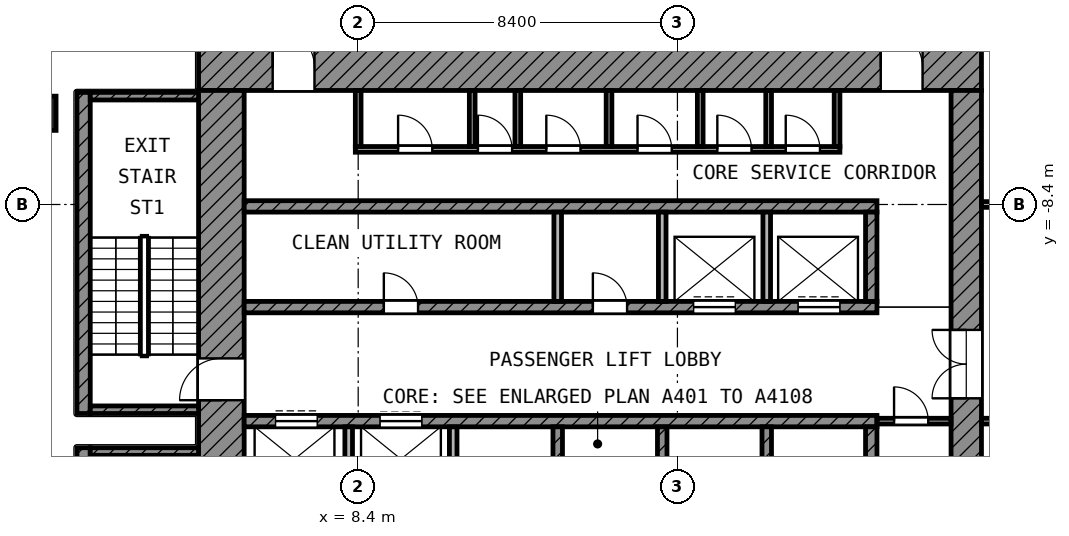
"""IFC4 building model, lengths in metres.
Left out: names, types, materials, properties, quantities, classifications, styles, units other than length and angle.
Written with IfcOpenShell. Run it as: python <this file> out.ifc"""

import sys

from ifc_helpers import new_model, si_unit, direction, frame, frame_2d, origin, origin_2d, place, context, subcontext, project, spatial, rectangle, extrude, element, fill, save


model = new_model("IFC4")
c1 = context("Model", 3, precision=1e-05, world=origin(), true_north=direction((0.0, 1.0)))
c2 = subcontext(c1, "Body", "Model", "MODEL_VIEW")
j1 = project(units=[si_unit("LENGTHUNIT", "METRE"), si_unit("PLANEANGLEUNIT", "RADIAN")], contexts=[c1])
p1 = place(None, origin())
s1 = spatial("IfcSite", under=j1, at=p1, CompositionType="ELEMENT")
p2 = place(p1, origin())
s2 = spatial("IfcBuilding", under=s1, at=p2, CompositionType="ELEMENT")
p3 = place(p2, frame((0.0, 0.0, 239.0)))
s3 = spatial("IfcBuildingStorey", under=s2, at=p3, CompositionType="ELEMENT", Elevation=239.0)
p4 = place(p3, frame((0.0, -6.0, 0.0), z_axis=(0.0, 0.0, 1.0), x_axis=(1.0, 0.0, 0.0)))
e1 = element("IfcColumn", 1, at=p4, inside=s3, PredefinedType="COLUMN", context=c2, shape_type="SweptSolid", body=[
    extrude(rectangle(XDim=0.9, YDim=0.9, at=origin_2d()), origin(), (0.0, 0.0, 1.0), 4.2),
])
p5 = place(p3, frame((4.2, -4.8, 0.0), z_axis=(0.0, 0.0, 1.0), x_axis=(1.0, 0.0, 0.0)))
e2 = element("IfcWall", 2, at=p5, inside=s3, PredefinedType="SHEAR", context=c2, shape_type="SweptSolid", body=[
    extrude(rectangle(XDim=20.6, YDim=1.2, at=frame_2d((10.3, 0.0))), origin(), (0.0, 0.0, 1.0), 3.6),
])
p6 = place(p5, frame((1.95, 0.0, 0.0)))
e3 = element("IfcOpeningElement", 3, at=p6, cuts=e2, PredefinedType="OPENING", context=c2, shape_type="SweptSolid", body=[
    extrude(rectangle(XDim=1.1, YDim=2.1, at=frame_2d((0.55, 1.05))), frame((0.0, 0.61, 0.0), z_axis=(0.0, -1.0, 0.0), x_axis=(1.0, 0.0, 0.0)), (0.0, 0.0, 1.0), 1.22),
])
p7 = place(p5, frame((17.95, 0.0, 0.0)))
e4 = element("IfcOpeningElement", 4, at=p7, cuts=e2, PredefinedType="OPENING", context=c2, shape_type="SweptSolid", body=[
    extrude(rectangle(XDim=1.1, YDim=2.1, at=frame_2d((0.55, 1.05))), frame((0.0, 0.61, 0.0), z_axis=(0.0, -1.0, 0.0), x_axis=(1.0, 0.0, 0.0)), (0.0, 0.0, 1.0), 1.22),
])
p8 = place(p3, frame((4.8, -24.8, 0.0), z_axis=(0.0, 0.0, 1.0), x_axis=(0.0, 1.0, 0.0)))
e5 = element("IfcWall", 5, at=p8, inside=s3, PredefinedType="SHEAR", context=c2, shape_type="SweptSolid", body=[
    extrude(rectangle(XDim=19.4, YDim=1.2, at=frame_2d((9.7, 0.0))), origin(), (0.0, 0.0, 1.0), 3.6),
])
p9 = place(p8, frame((11.25, 0.0, 0.0)))
e6 = element("IfcOpeningElement", 6, at=p9, cuts=e5, PredefinedType="OPENING", context=c2, shape_type="SweptSolid", body=[
    extrude(rectangle(XDim=1.1, YDim=2.1, at=frame_2d((0.55, 1.05))), frame((0.0, 0.61, 0.0), z_axis=(0.0, -1.0, 0.0), x_axis=(1.0, 0.0, 0.0)), (0.0, 0.0, 1.0), 1.22),
])
p10 = place(p8, frame((1.95, 0.0, 0.0)))
e7 = element("IfcOpeningElement", 7, at=p10, cuts=e5, PredefinedType="OPENING", context=c2, shape_type="SweptSolid", body=[
    extrude(rectangle(XDim=1.1, YDim=2.1, at=frame_2d((0.55, 1.05))), frame((0.0, 0.61, 0.0), z_axis=(0.0, -1.0, 0.0), x_axis=(1.0, 0.0, 0.0)), (0.0, 0.0, 1.0), 1.22),
])
p11 = place(p3, frame((24.4, -24.0, 0.0), z_axis=(0.0, 0.0, 1.0), x_axis=(0.0, 1.0, 0.0)))
e8 = element("IfcWall", 8, at=p11, inside=s3, PredefinedType="SHEAR", context=c2, shape_type="SweptSolid", body=[
    extrude(rectangle(XDim=18.6, YDim=0.8, at=frame_2d((9.3, 0.0))), origin(), (0.0, 0.0, 1.0), 3.6),
])
p12 = place(p11, frame((10.5, 0.0, 0.0)))
e9 = element("IfcOpeningElement", 9, at=p12, cuts=e8, PredefinedType="OPENING", context=c2, shape_type="SweptSolid", body=[
    extrude(rectangle(XDim=1.8, YDim=2.1, at=frame_2d((0.9, 1.05))), frame((0.0, 0.41, 0.0), z_axis=(0.0, -1.0, 0.0), x_axis=(1.0, 0.0, 0.0)), (0.0, 0.0, 1.0), 0.82),
])
p13 = place(p3, frame((5.4, -8.45, 0.0), z_axis=(0.0, 0.0, 1.0), x_axis=(1.0, 0.0, 0.0)))
e10 = element("IfcWall", 10, at=p13, inside=s3, PredefinedType="SHEAR", context=c2, shape_type="SweptSolid", body=[
    extrude(rectangle(XDim=16.65, YDim=0.3, at=frame_2d((8.325, 0.0))), origin(), (0.0, 0.0, 1.0), 3.6),
])
p14 = place(p3, frame((5.4, -11.1, 0.0), z_axis=(0.0, 0.0, 1.0), x_axis=(1.0, 0.0, 0.0)))
e11 = element("IfcWall", 11, at=p14, inside=s3, PredefinedType="SHEAR", context=c2, shape_type="SweptSolid", body=[
    extrude(rectangle(XDim=16.65, YDim=0.3, at=frame_2d((8.325, 0.0))), origin(), (0.0, 0.0, 1.0), 3.6),
])
p15 = place(p14, frame((11.825, 0.0, 0.0)))
e12 = element("IfcOpeningElement", 12, at=p15, cuts=e11, PredefinedType="OPENING", context=c2, shape_type="SweptSolid", body=[
    extrude(rectangle(XDim=1.1, YDim=2.1, at=frame_2d((0.55, 1.05))), frame((0.0, 0.16, 0.0), z_axis=(0.0, -1.0, 0.0), x_axis=(1.0, 0.0, 0.0)), (0.0, 0.0, 1.0), 0.32),
])
p16 = place(p14, frame((14.575, 0.0, 0.0)))
e13 = element("IfcOpeningElement", 13, at=p16, cuts=e11, PredefinedType="OPENING", context=c2, shape_type="SweptSolid", body=[
    extrude(rectangle(XDim=1.1, YDim=2.1, at=frame_2d((0.55, 1.05))), frame((0.0, 0.16, 0.0), z_axis=(0.0, -1.0, 0.0), x_axis=(1.0, 0.0, 0.0)), (0.0, 0.0, 1.0), 0.32),
])
p17 = place(p14, frame((3.675, 0.0, 0.0)))
e14 = element("IfcOpeningElement", 14, at=p17, cuts=e11, PredefinedType="OPENING", context=c2, shape_type="SweptSolid", body=[
    extrude(rectangle(XDim=0.9, YDim=2.1, at=frame_2d((0.45, 1.05))), frame((0.0, 0.16, 0.0), z_axis=(0.0, -1.0, 0.0), x_axis=(1.0, 0.0, 0.0)), (0.0, 0.0, 1.0), 0.32),
])
p18 = place(p14, frame((9.175, 0.0, 0.0)))
e15 = element("IfcOpeningElement", 15, at=p18, cuts=e11, PredefinedType="OPENING", context=c2, shape_type="SweptSolid", body=[
    extrude(rectangle(XDim=0.9, YDim=2.1, at=frame_2d((0.45, 1.05))), frame((0.0, 0.16, 0.0), z_axis=(0.0, -1.0, 0.0), x_axis=(1.0, 0.0, 0.0)), (0.0, 0.0, 1.0), 0.32),
])
p19 = place(p3, frame((5.4, -14.1, 0.0), z_axis=(0.0, 0.0, 1.0), x_axis=(1.0, 0.0, 0.0)))
e16 = element("IfcWall", 16, at=p19, inside=s3, PredefinedType="SHEAR", context=c2, shape_type="SweptSolid", body=[
    extrude(rectangle(XDim=16.65, YDim=0.3, at=frame_2d((8.325, 0.0))), origin(), (0.0, 0.0, 1.0), 3.6),
])
p20 = place(p19, frame((0.825, 0.0, 0.0)))
e17 = element("IfcOpeningElement", 17, at=p20, cuts=e16, PredefinedType="OPENING", context=c2, shape_type="SweptSolid", body=[
    extrude(rectangle(XDim=1.1, YDim=2.1, at=frame_2d((0.55, 1.05))), frame((0.0, 0.16, 0.0), z_axis=(0.0, -1.0, 0.0), x_axis=(1.0, 0.0, 0.0)), (0.0, 0.0, 1.0), 0.32),
])
p21 = place(p19, frame((3.575, 0.0, 0.0)))
e18 = element("IfcOpeningElement", 18, at=p21, cuts=e16, PredefinedType="OPENING", context=c2, shape_type="SweptSolid", body=[
    extrude(rectangle(XDim=1.1, YDim=2.1, at=frame_2d((0.55, 1.05))), frame((0.0, 0.16, 0.0), z_axis=(0.0, -1.0, 0.0), x_axis=(1.0, 0.0, 0.0)), (0.0, 0.0, 1.0), 0.32),
])
p22 = place(p3, frame((21.9, -10.95, 0.0), z_axis=(0.0, 0.0, 1.0), x_axis=(0.0, 1.0, 0.0)))
e19 = element("IfcWall", 19, at=p22, inside=s3, PredefinedType="SHEAR", context=c2, shape_type="SweptSolid", body=[
    extrude(rectangle(XDim=2.35, YDim=0.3, at=frame_2d((1.175, 0.0))), origin(), (0.0, 0.0, 1.0), 3.6),
])
p23 = place(p3, frame((21.9, -16.6, 0.0), z_axis=(0.0, 0.0, 1.0), x_axis=(0.0, 1.0, 0.0)))
e20 = element("IfcWall", 20, at=p23, inside=s3, PredefinedType="SHEAR", context=c2, shape_type="SweptSolid", body=[
    extrude(rectangle(XDim=2.35, YDim=0.3, at=frame_2d((1.175, 0.0))), origin(), (0.0, 0.0, 1.0), 3.6),
])
for number, where, z_axis, x_axis in (
    (21, (13.65, -10.95, 0.0), (0.0, 0.0, 1.0), (0.0, 1.0, 0.0)),
    (22, (16.4, -10.95, 0.0), (0.0, 0.0, 1.0), (0.0, 1.0, 0.0)),
    (23, (19.15, -10.95, 0.0), (0.0, 0.0, 1.0), (0.0, 1.0, 0.0)),
):
    element("IfcWall", number, at=place(p3, frame(where, z_axis=z_axis, x_axis=x_axis)), inside=s3, PredefinedType="PARTITIONING", context=c2, shape_type="SweptSolid", body=[
        extrude(rectangle(XDim=2.35, YDim=0.2, at=frame_2d((1.175, 0.0))), origin(), (0.0, 0.0, 1.0), 3.6),
    ])
for number, where, z_axis, x_axis in (
    (24, (8.15, -16.6, 0.0), (0.0, 0.0, 1.0), (0.0, 1.0, 0.0)),
    (25, (10.9, -16.6, 0.0), (0.0, 0.0, 1.0), (0.0, 1.0, 0.0)),
):
    element("IfcWall", number, at=place(p3, frame(where, z_axis=z_axis, x_axis=x_axis)), inside=s3, PredefinedType="PARTITIONING", context=c2, shape_type="SweptSolid", body=[
        extrude(rectangle(XDim=2.35, YDim=0.2, at=frame_2d((1.175, 0.0))), origin(), (0.0, 0.0, 1.0), 3.6),
    ])
for number, where, z_axis, x_axis in (
    (26, (13.65, -16.6, 0.0), (0.0, 0.0, 1.0), (0.0, 1.0, 0.0)),
    (27, (16.4, -16.6, 0.0), (0.0, 0.0, 1.0), (0.0, 1.0, 0.0)),
    (28, (19.15, -16.6, 0.0), (0.0, 0.0, 1.0), (0.0, 1.0, 0.0)),
):
    element("IfcWall", number, at=place(p3, frame(where, z_axis=z_axis, x_axis=x_axis)), inside=s3, PredefinedType="SHEAR", context=c2, shape_type="SweptSolid", body=[
        extrude(rectangle(XDim=2.35, YDim=0.25, at=frame_2d((1.175, 0.0))), origin(), (0.0, 0.0, 1.0), 3.6),
    ])
p24 = place(p3, frame((22.05, -14.1, 0.0), z_axis=(0.0, 0.0, 1.0), x_axis=(1.0, 0.0, 0.0)))
e29 = element("IfcWall", 29, at=p24, inside=s3, PredefinedType="PARTITIONING", context=c2, shape_type="SweptSolid", body=[
    extrude(rectangle(XDim=1.95, YDim=0.15, at=frame_2d((0.975, 0.0))), origin(), (0.0, 0.0, 1.0), 3.6),
])
p25 = place(p24, frame((0.45, 0.0, 0.0)))
e30 = element("IfcOpeningElement", 30, at=p25, cuts=e29, PredefinedType="OPENING", context=c2, shape_type="SweptSolid", body=[
    extrude(rectangle(XDim=0.9, YDim=2.1, at=frame_2d((0.45, 1.05))), frame((0.0, 0.085, 0.0), z_axis=(0.0, -1.0, 0.0), x_axis=(1.0, 0.0, 0.0)), (0.0, 0.0, 1.0), 0.17),
])
p26 = place(p3, frame((8.325, -6.95, 0.0), z_axis=(0.0, 0.0, 1.0), x_axis=(1.0, 0.0, 0.0)))
e31 = element("IfcWall", 31, at=p26, inside=s3, PredefinedType="PARTITIONING", context=c2, shape_type="SweptSolid", body=[
    extrude(rectangle(XDim=12.75, YDim=0.15, at=frame_2d((6.375, 0.0))), origin(), (0.0, 0.0, 1.0), 3.6),
])
p27 = place(p26, frame((1.125, 0.0, 0.0)))
e32 = element("IfcOpeningElement", 32, at=p27, cuts=e31, PredefinedType="OPENING", context=c2, shape_type="SweptSolid", body=[
    extrude(rectangle(XDim=0.9, YDim=2.1, at=frame_2d((0.45, 1.05))), frame((0.0, 0.085, 0.0), z_axis=(0.0, -1.0, 0.0), x_axis=(1.0, 0.0, 0.0)), (0.0, 0.0, 1.0), 0.17),
])
p28 = place(p26, frame((3.225, 0.0, 0.0)))
e33 = element("IfcOpeningElement", 33, at=p28, cuts=e31, PredefinedType="OPENING", context=c2, shape_type="SweptSolid", body=[
    extrude(rectangle(XDim=0.9, YDim=2.1, at=frame_2d((0.45, 1.05))), frame((0.0, 0.085, 0.0), z_axis=(0.0, -1.0, 0.0), x_axis=(1.0, 0.0, 0.0)), (0.0, 0.0, 1.0), 0.17),
])
p29 = place(p26, frame((5.025, 0.0, 0.0)))
e34 = element("IfcOpeningElement", 34, at=p29, cuts=e31, PredefinedType="OPENING", context=c2, shape_type="SweptSolid", body=[
    extrude(rectangle(XDim=0.9, YDim=2.1, at=frame_2d((0.45, 1.05))), frame((0.0, 0.085, 0.0), z_axis=(0.0, -1.0, 0.0), x_axis=(1.0, 0.0, 0.0)), (0.0, 0.0, 1.0), 0.17),
])
p30 = place(p26, frame((7.425, 0.0, 0.0)))
e35 = element("IfcOpeningElement", 35, at=p30, cuts=e31, PredefinedType="OPENING", context=c2, shape_type="SweptSolid", body=[
    extrude(rectangle(XDim=0.9, YDim=2.1, at=frame_2d((0.45, 1.05))), frame((0.0, 0.085, 0.0), z_axis=(0.0, -1.0, 0.0), x_axis=(1.0, 0.0, 0.0)), (0.0, 0.0, 1.0), 0.17),
])
p31 = place(p26, frame((9.525, 0.0, 0.0)))
e36 = element("IfcOpeningElement", 36, at=p31, cuts=e31, PredefinedType="OPENING", context=c2, shape_type="SweptSolid", body=[
    extrude(rectangle(XDim=0.9, YDim=2.1, at=frame_2d((0.45, 1.05))), frame((0.0, 0.085, 0.0), z_axis=(0.0, -1.0, 0.0), x_axis=(1.0, 0.0, 0.0)), (0.0, 0.0, 1.0), 0.17),
])
p32 = place(p26, frame((11.325, 0.0, 0.0)))
e37 = element("IfcOpeningElement", 37, at=p32, cuts=e31, PredefinedType="OPENING", context=c2, shape_type="SweptSolid", body=[
    extrude(rectangle(XDim=0.9, YDim=2.1, at=frame_2d((0.45, 1.05))), frame((0.0, 0.085, 0.0), z_axis=(0.0, -1.0, 0.0), x_axis=(1.0, 0.0, 0.0)), (0.0, 0.0, 1.0), 0.17),
])
for number, where, z_axis, x_axis in (
    (38, (8.4, -6.875, 0.0), (0.0, 0.0, 1.0), (0.0, 1.0, 0.0)),
    (39, (11.4, -6.875, 0.0), (0.0, 0.0, 1.0), (0.0, 1.0, 0.0)),
    (40, (12.6, -6.875, 0.0), (0.0, 0.0, 1.0), (0.0, 1.0, 0.0)),
    (41, (15.0, -6.875, 0.0), (0.0, 0.0, 1.0), (0.0, 1.0, 0.0)),
    (42, (17.4, -6.875, 0.0), (0.0, 0.0, 1.0), (0.0, 1.0, 0.0)),
    (43, (19.2, -6.875, 0.0), (0.0, 0.0, 1.0), (0.0, 1.0, 0.0)),
    (44, (21.0, -6.875, 0.0), (0.0, 0.0, 1.0), (0.0, 1.0, 0.0)),
):
    element("IfcWall", number, at=place(p3, frame(where, z_axis=z_axis, x_axis=x_axis)), inside=s3, PredefinedType="PARTITIONING", context=c2, shape_type="SweptSolid", body=[
        extrude(rectangle(XDim=1.475, YDim=0.15, at=frame_2d((0.738, 0.0))), origin(), (0.0, 0.0, 1.0), 3.6),
    ])
p33 = place(p3, frame((1.175, -13.9, 0.0), z_axis=(0.0, 0.0, 1.0), x_axis=(0.0, 1.0, 0.0)))
e45 = element("IfcWall", 45, at=p33, inside=s3, PredefinedType="SHEAR", context=c2, shape_type="SweptSolid", body=[
    extrude(rectangle(XDim=8.45, YDim=0.35, at=frame_2d((4.225, 0.0))), origin(), (0.0, 0.0, 1.0), 3.6),
])
for number, where, z_axis, x_axis in (
    (46, (1.35, -5.55, 0.0), (0.0, 0.0, 1.0), (1.0, 0.0, 0.0)),
    (47, (1.35, -13.8, 0.0), (0.0, 0.0, 1.0), (1.0, 0.0, 0.0)),
):
    element("IfcWall", number, at=place(p3, frame(where, z_axis=z_axis, x_axis=x_axis)), inside=s3, PredefinedType="SHEAR", context=c2, shape_type="SweptSolid", body=[
        extrude(rectangle(XDim=2.85, YDim=0.2, at=frame_2d((1.425, 0.0))), origin(), (0.0, 0.0, 1.0), 3.6),
    ])
p34 = place(p3, frame((1.175, -23.25, 0.0), z_axis=(0.0, 0.0, 1.0), x_axis=(0.0, 1.0, 0.0)))
e48 = element("IfcWall", 48, at=p34, inside=s3, PredefinedType="SHEAR", context=c2, shape_type="SweptSolid", body=[
    extrude(rectangle(XDim=8.45, YDim=0.35, at=frame_2d((4.225, 0.0))), origin(), (0.0, 0.0, 1.0), 3.6),
])
p35 = place(p3, frame((1.35, -14.9, 0.0), z_axis=(0.0, 0.0, 1.0), x_axis=(1.0, 0.0, 0.0)))
e49 = element("IfcWall", 49, at=p35, inside=s3, PredefinedType="SHEAR", context=c2, shape_type="SweptSolid", body=[
    extrude(rectangle(XDim=2.85, YDim=0.2, at=frame_2d((1.425, 0.0))), origin(), (0.0, 0.0, 1.0), 3.6),
])
p36 = place(p3, frame((24.8, -14.1, 0.0), z_axis=(0.0, 0.0, 1.0), x_axis=(1.0, 0.0, 0.0)))
e50 = element("IfcWall", 50, at=p36, inside=s3, PredefinedType="PARTITIONING", context=c2, shape_type="SweptSolid", body=[
    extrude(rectangle(XDim=4.525, YDim=0.15, at=frame_2d((2.262, 0.0))), origin(), (0.0, 0.0, 1.0), 3.6),
])
p37 = place(p36, frame((1.75, 0.0, 0.0)))
e51 = element("IfcOpeningElement", 51, at=p37, cuts=e50, PredefinedType="OPENING", context=c2, shape_type="SweptSolid", body=[
    extrude(rectangle(XDim=1.5, YDim=2.1, at=frame_2d((0.75, 1.05))), frame((0.0, 0.085, 0.0), z_axis=(0.0, -1.0, 0.0), x_axis=(1.0, 0.0, 0.0)), (0.0, 0.0, 1.0), 0.17),
])
p38 = place(p3, frame((24.8, -8.4, 0.0), z_axis=(0.0, 0.0, 1.0), x_axis=(1.0, 0.0, 0.0)))
e52 = element("IfcWall", 52, at=p38, inside=s3, PredefinedType="PARTITIONING", context=c2, shape_type="SweptSolid", body=[
    extrude(rectangle(XDim=15.432, YDim=0.15, at=frame_2d((7.716, 0.0))), origin(), (0.0, 0.0, 1.0), 3.6),
])
p39 = place(p38, frame((9.3, 0.0, 0.0)))
e53 = element("IfcOpeningElement", 53, at=p39, cuts=e52, PredefinedType="OPENING", context=c2, shape_type="SweptSolid", body=[
    extrude(rectangle(XDim=1.1, YDim=2.1, at=frame_2d((0.55, 1.05))), frame((0.0, 0.085, 0.0), z_axis=(0.0, -1.0, 0.0), x_axis=(1.0, 0.0, 0.0)), (0.0, 0.0, 1.0), 0.17),
])
p40 = place(p38, frame((0.95, 0.0, 0.0)))
e54 = element("IfcOpeningElement", 54, at=p40, cuts=e52, PredefinedType="OPENING", context=c2, shape_type="SweptSolid", body=[
    extrude(rectangle(XDim=1.0, YDim=2.1, at=frame_2d((0.5, 1.05))), frame((0.0, 0.085, 0.0), z_axis=(0.0, -1.0, 0.0), x_axis=(1.0, 0.0, 0.0)), (0.0, 0.0, 1.0), 0.17),
])
p41 = place(p38, frame((5.05, 0.0, 0.0)))
e55 = element("IfcOpeningElement", 55, at=p41, cuts=e52, PredefinedType="OPENING", context=c2, shape_type="SweptSolid", body=[
    extrude(rectangle(XDim=1.2, YDim=2.1, at=frame_2d((0.6, 1.05))), frame((0.0, 0.085, 0.0), z_axis=(0.0, -1.0, 0.0), x_axis=(1.0, 0.0, 0.0)), (0.0, 0.0, 1.0), 0.17),
])
p42 = place(p15, origin())
e56 = element("IfcDoor", 56, at=p42, inside=s3, OperationType="DOUBLE_DOOR_SLIDING", PredefinedType="DOOR", context=c2, shape_type="SweptSolid", body=[
    extrude(rectangle(XDim=1.1, YDim=2.1, at=frame_2d((0.55, 1.05))), frame((0.0, 0.025, 0.0), z_axis=(0.0, -1.0, 0.0), x_axis=(1.0, 0.0, 0.0)), (0.0, 0.0, 1.0), 0.05),
])
fill(e12, e56)
p43 = place(p16, origin())
e57 = element("IfcDoor", 57, at=p43, inside=s3, OperationType="DOUBLE_DOOR_SLIDING", PredefinedType="DOOR", context=c2, shape_type="SweptSolid", body=[
    extrude(rectangle(XDim=1.1, YDim=2.1, at=frame_2d((0.55, 1.05))), frame((0.0, 0.025, 0.0), z_axis=(0.0, -1.0, 0.0), x_axis=(1.0, 0.0, 0.0)), (0.0, 0.0, 1.0), 0.05),
])
fill(e13, e57)
p44 = place(p20, origin())
e58 = element("IfcDoor", 58, at=p44, inside=s3, OperationType="DOUBLE_DOOR_SLIDING", PredefinedType="DOOR", context=c2, shape_type="SweptSolid", body=[
    extrude(rectangle(XDim=1.1, YDim=2.1, at=frame_2d((0.55, 1.05))), frame((0.0, 0.025, 0.0), z_axis=(0.0, -1.0, 0.0), x_axis=(1.0, 0.0, 0.0)), (0.0, 0.0, 1.0), 0.05),
])
fill(e17, e58)
p45 = place(p21, origin())
e59 = element("IfcDoor", 59, at=p45, inside=s3, OperationType="DOUBLE_DOOR_SLIDING", PredefinedType="DOOR", context=c2, shape_type="SweptSolid", body=[
    extrude(rectangle(XDim=1.1, YDim=2.1, at=frame_2d((0.55, 1.05))), frame((0.0, 0.025, 0.0), z_axis=(0.0, -1.0, 0.0), x_axis=(1.0, 0.0, 0.0)), (0.0, 0.0, 1.0), 0.05),
])
fill(e18, e59)
p46 = place(p9, origin())
e60 = element("IfcDoor", 60, at=p46, inside=s3, OperationType="SINGLE_SWING_LEFT", PredefinedType="DOOR", context=c2, shape_type="SweptSolid", body=[
    extrude(rectangle(XDim=1.1, YDim=2.1, at=frame_2d((0.55, 1.05))), frame((0.0, 0.025, 0.0), z_axis=(0.0, -1.0, 0.0), x_axis=(1.0, 0.0, 0.0)), (0.0, 0.0, 1.0), 0.05),
])
fill(e6, e60)
p47 = place(p6, origin())
e61 = element("IfcDoor", 61, at=p47, inside=s3, OperationType="SINGLE_SWING_LEFT", PredefinedType="DOOR", context=c2, shape_type="SweptSolid", body=[
    extrude(rectangle(XDim=1.1, YDim=2.1, at=frame_2d((0.55, 1.05))), frame((0.0, 0.025, 0.0), z_axis=(0.0, -1.0, 0.0), x_axis=(1.0, 0.0, 0.0)), (0.0, 0.0, 1.0), 0.05),
])
fill(e3, e61)
p48 = place(p7, origin())
e62 = element("IfcDoor", 62, at=p48, inside=s3, OperationType="SINGLE_SWING_LEFT", PredefinedType="DOOR", context=c2, shape_type="SweptSolid", body=[
    extrude(rectangle(XDim=1.1, YDim=2.1, at=frame_2d((0.55, 1.05))), frame((0.0, 0.025, 0.0), z_axis=(0.0, -1.0, 0.0), x_axis=(1.0, 0.0, 0.0)), (0.0, 0.0, 1.0), 0.05),
])
fill(e4, e62)
p49 = place(p12, origin())
e63 = element("IfcDoor", 63, at=p49, inside=s3, OperationType="DOUBLE_DOOR_SINGLE_SWING", PredefinedType="DOOR", context=c2, shape_type="SweptSolid", body=[
    extrude(rectangle(XDim=1.8, YDim=2.1, at=frame_2d((0.9, 1.05))), frame((0.0, 0.025, 0.0), z_axis=(0.0, -1.0, 0.0), x_axis=(1.0, 0.0, 0.0)), (0.0, 0.0, 1.0), 0.05),
])
fill(e9, e63)
p50 = place(p27, origin())
e64 = element("IfcDoor", 64, at=p50, inside=s3, OperationType="SINGLE_SWING_LEFT", PredefinedType="DOOR", context=c2, shape_type="SweptSolid", body=[
    extrude(rectangle(XDim=0.9, YDim=2.1, at=frame_2d((0.45, 1.05))), frame((0.0, 0.025, 0.0), z_axis=(0.0, -1.0, 0.0), x_axis=(1.0, 0.0, 0.0)), (0.0, 0.0, 1.0), 0.05),
])
fill(e32, e64)
p51 = place(p28, origin())
e65 = element("IfcDoor", 65, at=p51, inside=s3, OperationType="SINGLE_SWING_LEFT", PredefinedType="DOOR", context=c2, shape_type="SweptSolid", body=[
    extrude(rectangle(XDim=0.9, YDim=2.1, at=frame_2d((0.45, 1.05))), frame((0.0, 0.025, 0.0), z_axis=(0.0, -1.0, 0.0), x_axis=(1.0, 0.0, 0.0)), (0.0, 0.0, 1.0), 0.05),
])
fill(e33, e65)
p52 = place(p29, origin())
e66 = element("IfcDoor", 66, at=p52, inside=s3, OperationType="SINGLE_SWING_LEFT", PredefinedType="DOOR", context=c2, shape_type="SweptSolid", body=[
    extrude(rectangle(XDim=0.9, YDim=2.1, at=frame_2d((0.45, 1.05))), frame((0.0, 0.025, 0.0), z_axis=(0.0, -1.0, 0.0), x_axis=(1.0, 0.0, 0.0)), (0.0, 0.0, 1.0), 0.05),
])
fill(e34, e66)
p53 = place(p30, origin())
e67 = element("IfcDoor", 67, at=p53, inside=s3, OperationType="SINGLE_SWING_LEFT", PredefinedType="DOOR", context=c2, shape_type="SweptSolid", body=[
    extrude(rectangle(XDim=0.9, YDim=2.1, at=frame_2d((0.45, 1.05))), frame((0.0, 0.025, 0.0), z_axis=(0.0, -1.0, 0.0), x_axis=(1.0, 0.0, 0.0)), (0.0, 0.0, 1.0), 0.05),
])
fill(e35, e67)
p54 = place(p31, origin())
e68 = element("IfcDoor", 68, at=p54, inside=s3, OperationType="SINGLE_SWING_LEFT", PredefinedType="DOOR", context=c2, shape_type="SweptSolid", body=[
    extrude(rectangle(XDim=0.9, YDim=2.1, at=frame_2d((0.45, 1.05))), frame((0.0, 0.025, 0.0), z_axis=(0.0, -1.0, 0.0), x_axis=(1.0, 0.0, 0.0)), (0.0, 0.0, 1.0), 0.05),
])
fill(e36, e68)
p55 = place(p32, origin())
e69 = element("IfcDoor", 69, at=p55, inside=s3, OperationType="SINGLE_SWING_LEFT", PredefinedType="DOOR", context=c2, shape_type="SweptSolid", body=[
    extrude(rectangle(XDim=0.9, YDim=2.1, at=frame_2d((0.45, 1.05))), frame((0.0, 0.025, 0.0), z_axis=(0.0, -1.0, 0.0), x_axis=(1.0, 0.0, 0.0)), (0.0, 0.0, 1.0), 0.05),
])
fill(e37, e69)
p56 = place(p25, origin())
e70 = element("IfcDoor", 70, at=p56, inside=s3, OperationType="SINGLE_SWING_LEFT", PredefinedType="DOOR", context=c2, shape_type="SweptSolid", body=[
    extrude(rectangle(XDim=0.9, YDim=2.1, at=frame_2d((0.45, 1.05))), frame((0.0, 0.025, 0.0), z_axis=(0.0, -1.0, 0.0), x_axis=(1.0, 0.0, 0.0)), (0.0, 0.0, 1.0), 0.05),
])
fill(e30, e70)
p57 = place(p17, origin())
e71 = element("IfcDoor", 71, at=p57, inside=s3, OperationType="SINGLE_SWING_LEFT", PredefinedType="DOOR", context=c2, shape_type="SweptSolid", body=[
    extrude(rectangle(XDim=0.9, YDim=2.1, at=frame_2d((0.45, 1.05))), frame((0.0, 0.025, 0.0), z_axis=(0.0, -1.0, 0.0), x_axis=(1.0, 0.0, 0.0)), (0.0, 0.0, 1.0), 0.05),
])
fill(e14, e71)
p58 = place(p18, origin())
e72 = element("IfcDoor", 72, at=p58, inside=s3, OperationType="SINGLE_SWING_LEFT", PredefinedType="DOOR", context=c2, shape_type="SweptSolid", body=[
    extrude(rectangle(XDim=0.9, YDim=2.1, at=frame_2d((0.45, 1.05))), frame((0.0, 0.025, 0.0), z_axis=(0.0, -1.0, 0.0), x_axis=(1.0, 0.0, 0.0)), (0.0, 0.0, 1.0), 0.05),
])
fill(e15, e72)
save(model, sys.argv[1])
